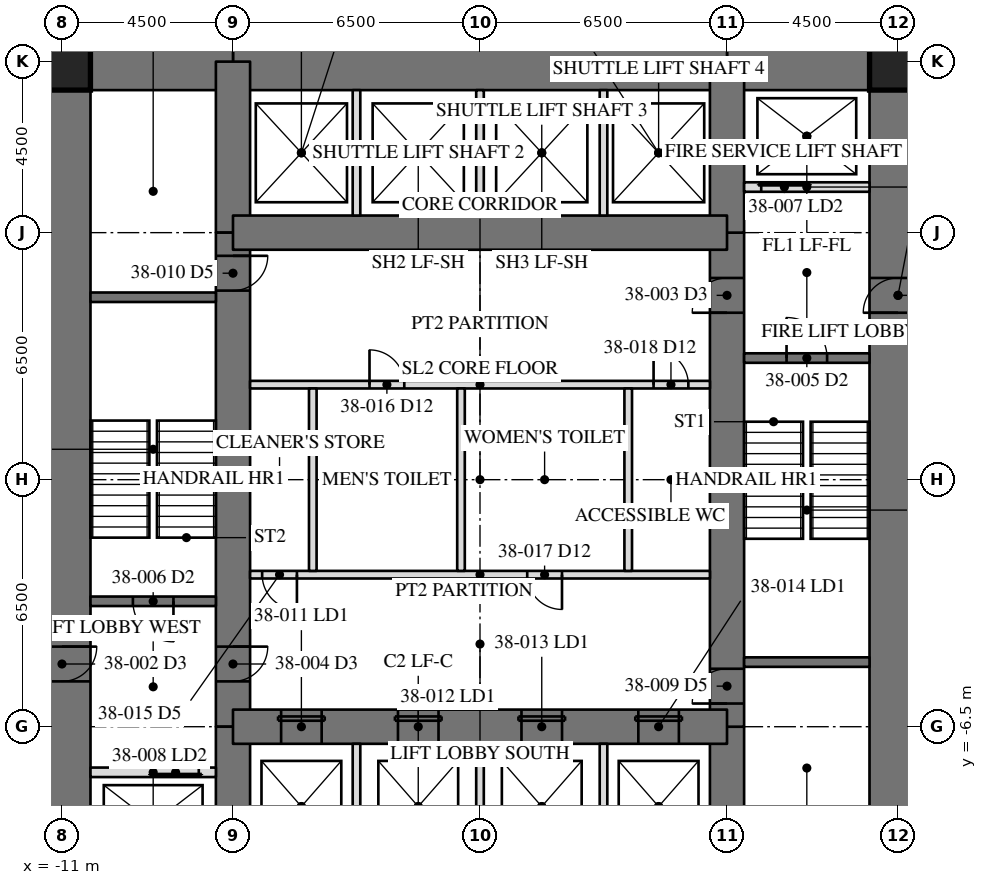
"""IFC4 building model, lengths in metres.
Left out: names, types, materials, properties, quantities, classifications, styles, units other than length and angle.
Written with IfcOpenShell. Run it as: python <this file> out.ifc"""

import sys

from ifc_helpers import new_model, si_unit, direction, frame, frame_2d, origin, origin_2d, place, context, subcontext, project, spatial, rectangle, hollow_rectangle, extrude, element, fill, save


model = new_model("IFC4")
c1 = context("Model", 3, precision=1e-05, world=origin(), true_north=direction((0.0, 1.0)))
c2 = subcontext(c1, "Body", "Model", "MODEL_VIEW")
j1 = project(units=[si_unit("LENGTHUNIT", "METRE"), si_unit("PLANEANGLEUNIT", "RADIAN")], contexts=[c1])
p1 = place(None, origin())
s1 = spatial("IfcSite", under=j1, at=p1, CompositionType="ELEMENT")
p2 = place(p1, origin())
s2 = spatial("IfcBuilding", under=s1, at=p2, CompositionType="ELEMENT")
p3 = place(p2, frame((0.0, 0.0, 162.3)))
s3 = spatial("IfcBuildingStorey", under=s2, at=p3, CompositionType="ELEMENT", Elevation=162.3)
p4 = place(p3, frame((11.0, -11.0, 0.0), z_axis=(0.0, 0.0, 1.0), x_axis=(0.0, 1.0, 0.0)))
e1 = element("IfcWall", 1, at=p4, inside=s3, PredefinedType="SHEAR", context=c2, shape_type="SweptSolid", body=[
    extrude(rectangle(XDim=22.0, YDim=1.5, at=frame_2d((11.0, 0.0))), origin(), (0.0, 0.0, 1.0), 4.1),
])
p5 = place(p4, frame((15.393, 0.0, 0.0)))
e2 = element("IfcOpeningElement", 2, at=p5, cuts=e1, PredefinedType="OPENING", context=c2, shape_type="SweptSolid", body=[
    extrude(rectangle(XDim=0.915, YDim=2.134, at=frame_2d((0.458, 1.067))), frame((0.0, 0.76, 0.0), z_axis=(0.0, -1.0, 0.0), x_axis=(1.0, 0.0, 0.0)), (0.0, 0.0, 1.0), 1.52),
])
p6 = place(p3, frame((-11.0, 11.0, 0.0), z_axis=(0.0, 0.0, 1.0), x_axis=(0.0, -1.0, 0.0)))
e3 = element("IfcWall", 3, at=p6, inside=s3, PredefinedType="SHEAR", context=c2, shape_type="SweptSolid", body=[
    extrude(rectangle(XDim=22.0, YDim=1.5, at=frame_2d((11.0, 0.0))), origin(), (0.0, 0.0, 1.0), 4.1),
])
p7 = place(p6, frame((15.393, 0.0, 0.0)))
e4 = element("IfcOpeningElement", 4, at=p7, cuts=e3, PredefinedType="OPENING", context=c2, shape_type="SweptSolid", body=[
    extrude(rectangle(XDim=0.915, YDim=2.134, at=frame_2d((0.458, 1.067))), frame((0.0, 0.76, 0.0), z_axis=(0.0, -1.0, 0.0), x_axis=(1.0, 0.0, 0.0)), (0.0, 0.0, 1.0), 1.52),
])
p8 = place(p3, frame((11.0, 11.0, 0.0), z_axis=(0.0, 0.0, 1.0), x_axis=(-1.0, 0.0, 0.0)))
e5 = element("IfcWall", 5, at=p8, inside=s3, PredefinedType="SHEAR", context=c2, shape_type="SweptSolid", body=[
    extrude(rectangle(XDim=4.5, YDim=1.5, at=frame_2d((2.25, 0.0))), origin(), (0.0, 0.0, 1.0), 4.1),
])
p9 = place(p3, frame((6.5, 11.0, 0.0), z_axis=(0.0, 0.0, 1.0), x_axis=(-1.0, 0.0, 0.0)))
e6 = element("IfcWall", 6, at=p9, inside=s3, PredefinedType="SHEAR", context=c2, shape_type="SweptSolid", body=[
    extrude(rectangle(XDim=13.0, YDim=1.5, at=frame_2d((6.5, 0.0))), origin(), (0.0, 0.0, 1.0), 4.1),
])
p10 = place(p3, frame((-6.5, 11.0, 0.0), z_axis=(0.0, 0.0, 1.0), x_axis=(-1.0, 0.0, 0.0)))
e7 = element("IfcWall", 7, at=p10, inside=s3, PredefinedType="SHEAR", context=c2, shape_type="SweptSolid", body=[
    extrude(rectangle(XDim=4.5, YDim=1.5, at=frame_2d((2.25, 0.0))), origin(), (0.0, 0.0, 1.0), 4.1),
])
p11 = place(p3, frame((6.5, -11.0, 0.0), z_axis=(0.0, 0.0, 1.0), x_axis=(0.0, 1.0, 0.0)))
e8 = element("IfcWall", 8, at=p11, inside=s3, PredefinedType="SHEAR", context=c2, shape_type="SweptSolid", body=[
    extrude(rectangle(XDim=4.5, YDim=0.9, at=frame_2d((2.25, 0.0))), origin(), (0.0, 0.0, 1.0), 4.1),
])
p12 = place(p3, frame((6.5, -6.5, 0.0), z_axis=(0.0, 0.0, 1.0), x_axis=(0.0, 1.0, 0.0)))
e9 = element("IfcWall", 9, at=p12, inside=s3, PredefinedType="SHEAR", context=c2, shape_type="SweptSolid", body=[
    extrude(rectangle(XDim=13.0, YDim=0.9, at=frame_2d((6.5, 0.0))), origin(), (0.0, 0.0, 1.0), 4.1),
])
p13 = place(p12, frame((10.893, 0.0, 0.0)))
e10 = element("IfcOpeningElement", 10, at=p13, cuts=e9, PredefinedType="OPENING", context=c2, shape_type="SweptSolid", body=[
    extrude(rectangle(XDim=0.915, YDim=2.134, at=frame_2d((0.458, 1.067))), frame((0.0, 0.46, 0.0), z_axis=(0.0, -1.0, 0.0), x_axis=(1.0, 0.0, 0.0)), (0.0, 0.0, 1.0), 0.92),
])
p14 = place(p12, frame((0.61, 0.0, 0.0)))
e11 = element("IfcOpeningElement", 11, at=p14, cuts=e9, PredefinedType="OPENING", context=c2, shape_type="SweptSolid", body=[
    extrude(rectangle(XDim=0.915, YDim=2.134, at=frame_2d((0.458, 1.067))), frame((0.0, 0.46, 0.0), z_axis=(0.0, -1.0, 0.0), x_axis=(1.0, 0.0, 0.0)), (0.0, 0.0, 1.0), 0.92),
])
for number, where, z_axis, x_axis in (
    (12, (6.5, 6.5, 0.0), (0.0, 0.0, 1.0), (0.0, 1.0, 0.0)),
    (13, (-6.5, 11.0, 0.0), (0.0, 0.0, 1.0), (0.0, -1.0, 0.0)),
):
    element("IfcWall", number, at=place(p3, frame(where, z_axis=z_axis, x_axis=x_axis)), inside=s3, PredefinedType="SHEAR", context=c2, shape_type="SweptSolid", body=[
        extrude(rectangle(XDim=4.5, YDim=0.9, at=frame_2d((2.25, 0.0))), origin(), (0.0, 0.0, 1.0), 4.1),
    ])
p15 = place(p3, frame((-6.5, 6.5, 0.0), z_axis=(0.0, 0.0, 1.0), x_axis=(0.0, -1.0, 0.0)))
e14 = element("IfcWall", 14, at=p15, inside=s3, PredefinedType="SHEAR", context=c2, shape_type="SweptSolid", body=[
    extrude(rectangle(XDim=13.0, YDim=0.9, at=frame_2d((6.5, 0.0))), origin(), (0.0, 0.0, 1.0), 4.1),
])
p16 = place(p15, frame((10.893, 0.0, 0.0)))
e15 = element("IfcOpeningElement", 15, at=p16, cuts=e14, PredefinedType="OPENING", context=c2, shape_type="SweptSolid", body=[
    extrude(rectangle(XDim=0.915, YDim=2.134, at=frame_2d((0.458, 1.067))), frame((0.0, 0.46, 0.0), z_axis=(0.0, -1.0, 0.0), x_axis=(1.0, 0.0, 0.0)), (0.0, 0.0, 1.0), 0.92),
])
p17 = place(p15, frame((0.61, 0.0, 0.0)))
e16 = element("IfcOpeningElement", 16, at=p17, cuts=e14, PredefinedType="OPENING", context=c2, shape_type="SweptSolid", body=[
    extrude(rectangle(XDim=0.915, YDim=2.134, at=frame_2d((0.458, 1.067))), frame((0.0, 0.46, 0.0), z_axis=(0.0, -1.0, 0.0), x_axis=(1.0, 0.0, 0.0)), (0.0, 0.0, 1.0), 0.92),
])
p18 = place(p3, frame((-6.5, -6.5, 0.0), z_axis=(0.0, 0.0, 1.0), x_axis=(0.0, -1.0, 0.0)))
e17 = element("IfcWall", 17, at=p18, inside=s3, PredefinedType="SHEAR", context=c2, shape_type="SweptSolid", body=[
    extrude(rectangle(XDim=4.5, YDim=0.9, at=frame_2d((2.25, 0.0))), origin(), (0.0, 0.0, 1.0), 4.1),
])
p19 = place(p3, frame((6.5, 6.5, 0.0), z_axis=(0.0, 0.0, 1.0), x_axis=(-1.0, 0.0, 0.0)))
e18 = element("IfcWall", 18, at=p19, inside=s3, PredefinedType="SHEAR", context=c2, shape_type="SweptSolid", body=[
    extrude(rectangle(XDim=13.0, YDim=0.9, at=frame_2d((6.5, 0.0))), origin(), (0.0, 0.0, 1.0), 4.1),
])
p20 = place(p3, frame((-6.5, -6.5, 0.0), z_axis=(0.0, 0.0, 1.0), x_axis=(1.0, 0.0, 0.0)))
e19 = element("IfcWall", 19, at=p20, inside=s3, PredefinedType="SHEAR", context=c2, shape_type="SweptSolid", body=[
    extrude(rectangle(XDim=13.0, YDim=0.9, at=frame_2d((6.5, 0.0))), origin(), (0.0, 0.0, 1.0), 4.1),
])
p21 = place(p20, frame((1.267, 0.0, 0.0)))
e20 = element("IfcOpeningElement", 20, at=p21, cuts=e19, PredefinedType="OPENING", context=c2, shape_type="SweptSolid", body=[
    extrude(rectangle(XDim=1.067, YDim=2.134, at=frame_2d((0.533, 1.067))), frame((0.0, 0.46, 0.0), z_axis=(0.0, -1.0, 0.0), x_axis=(1.0, 0.0, 0.0)), (0.0, 0.0, 1.0), 0.92),
])
p22 = place(p20, frame((4.342, 0.0, 0.0)))
e21 = element("IfcOpeningElement", 21, at=p22, cuts=e19, PredefinedType="OPENING", context=c2, shape_type="SweptSolid", body=[
    extrude(rectangle(XDim=1.067, YDim=2.134, at=frame_2d((0.533, 1.067))), frame((0.0, 0.46, 0.0), z_axis=(0.0, -1.0, 0.0), x_axis=(1.0, 0.0, 0.0)), (0.0, 0.0, 1.0), 0.92),
])
p23 = place(p20, frame((7.592, 0.0, 0.0)))
e22 = element("IfcOpeningElement", 22, at=p23, cuts=e19, PredefinedType="OPENING", context=c2, shape_type="SweptSolid", body=[
    extrude(rectangle(XDim=1.067, YDim=2.134, at=frame_2d((0.533, 1.067))), frame((0.0, 0.46, 0.0), z_axis=(0.0, -1.0, 0.0), x_axis=(1.0, 0.0, 0.0)), (0.0, 0.0, 1.0), 0.92),
])
p24 = place(p20, frame((10.667, 0.0, 0.0)))
e23 = element("IfcOpeningElement", 23, at=p24, cuts=e19, PredefinedType="OPENING", context=c2, shape_type="SweptSolid", body=[
    extrude(rectangle(XDim=1.067, YDim=2.134, at=frame_2d((0.533, 1.067))), frame((0.0, 0.46, 0.0), z_axis=(0.0, -1.0, 0.0), x_axis=(1.0, 0.0, 0.0)), (0.0, 0.0, 1.0), 0.92),
])
for number, where, z_axis, x_axis in (
    (24, (11.0, 11.0, 0.0), (0.0, 0.0, 1.0), (1.0, 0.0, 0.0)),
    (25, (-11.0, 11.0, 0.0), (0.0, 0.0, 1.0), (1.0, 0.0, 0.0)),
):
    element("IfcColumn", number, at=place(p3, frame(where, z_axis=z_axis, x_axis=x_axis)), inside=s3, PredefinedType="COLUMN", context=c2, shape_type="SweptSolid", body=[
        extrude(hollow_rectangle(XDim=1.499, YDim=1.499, WallThickness=0.102, at=origin_2d()), origin(), (0.0, 0.0, 1.0), 4.1),
    ])
for number, where, z_axis, x_axis in (
    (26, (6.95, -4.8, 0.0), (0.0, 0.0, 1.0), (1.0, 0.0, 0.0)),
    (27, (-6.95, 4.8, 0.0), (0.0, 0.0, 1.0), (-1.0, 0.0, 0.0)),
):
    element("IfcWall", number, at=place(p3, frame(where, z_axis=z_axis, x_axis=x_axis)), inside=s3, PredefinedType="SOLIDWALL", context=c2, shape_type="SweptSolid", body=[
        extrude(rectangle(XDim=3.3, YDim=0.25, at=frame_2d((1.65, 0.0))), origin(), (0.0, 0.0, 1.0), 3.91),
    ])
p25 = place(p3, frame((6.95, 3.2, 0.0), z_axis=(0.0, 0.0, 1.0), x_axis=(1.0, 0.0, 0.0)))
e28 = element("IfcWall", 28, at=p25, inside=s3, PredefinedType="SOLIDWALL", context=c2, shape_type="SweptSolid", body=[
    extrude(rectangle(XDim=3.3, YDim=0.25, at=frame_2d((1.65, 0.0))), origin(), (0.0, 0.0, 1.0), 3.91),
])
p26 = place(p25, frame((1.116, 0.0, 0.0)))
e29 = element("IfcOpeningElement", 29, at=p26, cuts=e28, PredefinedType="OPENING", context=c2, shape_type="SweptSolid", body=[
    extrude(rectangle(XDim=1.067, YDim=2.134, at=frame_2d((0.533, 1.067))), frame((0.0, 0.135, 0.0), z_axis=(0.0, -1.0, 0.0), x_axis=(1.0, 0.0, 0.0)), (0.0, 0.0, 1.0), 0.27),
])
p27 = place(p3, frame((-6.95, -3.2, 0.0), z_axis=(0.0, 0.0, 1.0), x_axis=(-1.0, 0.0, 0.0)))
e30 = element("IfcWall", 30, at=p27, inside=s3, PredefinedType="SOLIDWALL", context=c2, shape_type="SweptSolid", body=[
    extrude(rectangle(XDim=3.3, YDim=0.25, at=frame_2d((1.65, 0.0))), origin(), (0.0, 0.0, 1.0), 3.91),
])
p28 = place(p27, frame((1.116, 0.0, 0.0)))
e31 = element("IfcOpeningElement", 31, at=p28, cuts=e30, PredefinedType="OPENING", context=c2, shape_type="SweptSolid", body=[
    extrude(rectangle(XDim=1.067, YDim=2.134, at=frame_2d((0.533, 1.067))), frame((0.0, 0.135, 0.0), z_axis=(0.0, -1.0, 0.0), x_axis=(1.0, 0.0, 0.0)), (0.0, 0.0, 1.0), 0.27),
])
p29 = place(p3, frame((6.95, 7.7, 0.0), z_axis=(0.0, 0.0, 1.0), x_axis=(1.0, 0.0, 0.0)))
e32 = element("IfcWall", 32, at=p29, inside=s3, PredefinedType="PARTITIONING", context=c2, shape_type="SweptSolid", body=[
    extrude(rectangle(XDim=3.3, YDim=0.25, at=frame_2d((1.65, 0.0))), origin(), (0.0, 0.0, 1.0), 3.91),
])
p30 = place(p29, frame((0.45, 0.0, 0.0)))
e33 = element("IfcOpeningElement", 33, at=p30, cuts=e32, PredefinedType="OPENING", context=c2, shape_type="SweptSolid", body=[
    extrude(rectangle(XDim=1.219, YDim=2.134, at=frame_2d((0.609, 1.067))), frame((0.0, 0.135, 0.0), z_axis=(0.0, -1.0, 0.0), x_axis=(1.0, 0.0, 0.0)), (0.0, 0.0, 1.0), 0.27),
])
p31 = place(p3, frame((-6.95, -7.7, 0.0), z_axis=(0.0, 0.0, 1.0), x_axis=(-1.0, 0.0, 0.0)))
e34 = element("IfcWall", 34, at=p31, inside=s3, PredefinedType="PARTITIONING", context=c2, shape_type="SweptSolid", body=[
    extrude(rectangle(XDim=3.3, YDim=0.25, at=frame_2d((1.65, 0.0))), origin(), (0.0, 0.0, 1.0), 3.91),
])
p32 = place(p31, frame((0.45, 0.0, 0.0)))
e35 = element("IfcOpeningElement", 35, at=p32, cuts=e34, PredefinedType="OPENING", context=c2, shape_type="SweptSolid", body=[
    extrude(rectangle(XDim=1.219, YDim=2.134, at=frame_2d((0.609, 1.067))), frame((0.0, 0.135, 0.0), z_axis=(0.0, -1.0, 0.0), x_axis=(1.0, 0.0, 0.0)), (0.0, 0.0, 1.0), 0.27),
])
p33 = place(p3, frame((-6.05, 2.5, 0.0), z_axis=(0.0, 0.0, 1.0), x_axis=(1.0, 0.0, 0.0)))
e36 = element("IfcWall", 36, at=p33, inside=s3, PredefinedType="PARTITIONING", context=c2, shape_type="SweptSolid", body=[
    extrude(rectangle(XDim=12.1, YDim=0.2, at=frame_2d((6.05, 0.0))), origin(), (0.0, 0.0, 1.0), 3.91),
])
p34 = place(p33, frame((3.143, 0.0, 0.0)))
e37 = element("IfcOpeningElement", 37, at=p34, cuts=e36, PredefinedType="OPENING", context=c2, shape_type="SweptSolid", body=[
    extrude(rectangle(XDim=0.915, YDim=2.134, at=frame_2d((0.458, 1.067))), frame((0.0, 0.11, 0.0), z_axis=(0.0, -1.0, 0.0), x_axis=(1.0, 0.0, 0.0)), (0.0, 0.0, 1.0), 0.22),
])
p35 = place(p33, frame((10.617, 0.0, 0.0)))
e38 = element("IfcOpeningElement", 38, at=p35, cuts=e36, PredefinedType="OPENING", context=c2, shape_type="SweptSolid", body=[
    extrude(rectangle(XDim=0.915, YDim=2.134, at=frame_2d((0.458, 1.067))), frame((0.0, 0.11, 0.0), z_axis=(0.0, -1.0, 0.0), x_axis=(1.0, 0.0, 0.0)), (0.0, 0.0, 1.0), 0.22),
])
p36 = place(p3, frame((6.05, -2.5, 0.0), z_axis=(0.0, 0.0, 1.0), x_axis=(-1.0, 0.0, 0.0)))
e39 = element("IfcWall", 39, at=p36, inside=s3, PredefinedType="PARTITIONING", context=c2, shape_type="SweptSolid", body=[
    extrude(rectangle(XDim=12.1, YDim=0.2, at=frame_2d((6.05, 0.0))), origin(), (0.0, 0.0, 1.0), 3.91),
])
p37 = place(p36, frame((10.867, 0.0, 0.0)))
e40 = element("IfcOpeningElement", 40, at=p37, cuts=e39, PredefinedType="OPENING", context=c2, shape_type="SweptSolid", body=[
    extrude(rectangle(XDim=0.915, YDim=2.134, at=frame_2d((0.458, 1.067))), frame((0.0, 0.11, 0.0), z_axis=(0.0, -1.0, 0.0), x_axis=(1.0, 0.0, 0.0)), (0.0, 0.0, 1.0), 0.22),
])
p38 = place(p36, frame((3.893, 0.0, 0.0)))
e41 = element("IfcOpeningElement", 41, at=p38, cuts=e39, PredefinedType="OPENING", context=c2, shape_type="SweptSolid", body=[
    extrude(rectangle(XDim=0.915, YDim=2.134, at=frame_2d((0.458, 1.067))), frame((0.0, 0.11, 0.0), z_axis=(0.0, -1.0, 0.0), x_axis=(1.0, 0.0, 0.0)), (0.0, 0.0, 1.0), 0.22),
])
for number, where, z_axis, x_axis in (
    (42, (-3.25, 6.95, 0.0), (0.0, 0.0, 1.0), (0.0, 1.0, 0.0)),
    (43, (0.0, 6.95, 0.0), (0.0, 0.0, 1.0), (0.0, 1.0, 0.0)),
    (44, (3.25, 6.95, 0.0), (0.0, 0.0, 1.0), (0.0, 1.0, 0.0)),
    (45, (-3.25, -10.25, 0.0), (0.0, 0.0, 1.0), (0.0, 1.0, 0.0)),
    (46, (0.0, -10.25, 0.0), (0.0, 0.0, 1.0), (0.0, 1.0, 0.0)),
    (47, (3.25, -10.25, 0.0), (0.0, 0.0, 1.0), (0.0, 1.0, 0.0)),
):
    element("IfcWall", number, at=place(p3, frame(where, z_axis=z_axis, x_axis=x_axis)), inside=s3, PredefinedType="PARTITIONING", context=c2, shape_type="SweptSolid", body=[
        extrude(rectangle(XDim=3.3, YDim=0.2, at=frame_2d((1.65, 0.0))), origin(), (0.0, 0.0, 1.0), 3.91),
    ])
for number, where, z_axis, x_axis in (
    (48, (-4.4, -2.4, 0.0), (0.0, 0.0, 1.0), (0.0, 1.0, 0.0)),
    (49, (-0.5, -2.4, 0.0), (0.0, 0.0, 1.0), (0.0, 1.0, 0.0)),
    (50, (3.9, -2.4, 0.0), (0.0, 0.0, 1.0), (0.0, 1.0, 0.0)),
):
    element("IfcWall", number, at=place(p3, frame(where, z_axis=z_axis, x_axis=x_axis)), inside=s3, PredefinedType="PARTITIONING", context=c2, shape_type="SweptSolid", body=[
        extrude(rectangle(XDim=4.8, YDim=0.2, at=frame_2d((2.4, 0.0))), origin(), (0.0, 0.0, 1.0), 3.91),
    ])
p39 = place(p13, origin())
e51 = element("IfcDoor", 51, at=p39, inside=s3, OperationType="SINGLE_SWING_RIGHT", PredefinedType="DOOR", context=c2, shape_type="SweptSolid", body=[
    extrude(rectangle(XDim=0.915, YDim=2.134, at=frame_2d((0.458, 1.067))), frame((0.0, -0.375, 0.0), z_axis=(0.0, -1.0, 0.0), x_axis=(1.0, 0.0, 0.0)), (0.0, 0.0, 1.0), 0.05),
])
fill(e10, e51)
p40 = place(p16, origin())
e52 = element("IfcDoor", 52, at=p40, inside=s3, OperationType="SINGLE_SWING_RIGHT", PredefinedType="DOOR", context=c2, shape_type="SweptSolid", body=[
    extrude(rectangle(XDim=0.915, YDim=2.134, at=frame_2d((0.458, 1.067))), frame((0.0, -0.375, 0.0), z_axis=(0.0, -1.0, 0.0), x_axis=(1.0, 0.0, 0.0)), (0.0, 0.0, 1.0), 0.05),
])
fill(e15, e52)
p41 = place(p26, origin())
e53 = element("IfcDoor", 53, at=p41, inside=s3, OperationType="SINGLE_SWING_LEFT", PredefinedType="DOOR", context=c2, shape_type="SweptSolid", body=[
    extrude(rectangle(XDim=1.067, YDim=2.134, at=frame_2d((0.533, 1.067))), frame((0.0, 0.025, 0.0), z_axis=(0.0, -1.0, 0.0), x_axis=(1.0, 0.0, 0.0)), (0.0, 0.0, 1.0), 0.05),
])
fill(e29, e53)
p42 = place(p28, origin())
e54 = element("IfcDoor", 54, at=p42, inside=s3, OperationType="SINGLE_SWING_LEFT", PredefinedType="DOOR", context=c2, shape_type="SweptSolid", body=[
    extrude(rectangle(XDim=1.067, YDim=2.134, at=frame_2d((0.533, 1.067))), frame((0.0, 0.025, 0.0), z_axis=(0.0, -1.0, 0.0), x_axis=(1.0, 0.0, 0.0)), (0.0, 0.0, 1.0), 0.05),
])
fill(e31, e54)
p43 = place(p30, origin())
e55 = element("IfcDoor", 55, at=p43, inside=s3, OperationType="SLIDING_TO_LEFT", PredefinedType="DOOR", context=c2, shape_type="SweptSolid", body=[
    extrude(rectangle(XDim=1.219, YDim=2.134, at=frame_2d((0.609, 1.067))), frame((0.0, 0.025, 0.0), z_axis=(0.0, -1.0, 0.0), x_axis=(1.0, 0.0, 0.0)), (0.0, 0.0, 1.0), 0.05),
])
fill(e33, e55)
p44 = place(p32, origin())
e56 = element("IfcDoor", 56, at=p44, inside=s3, OperationType="SLIDING_TO_LEFT", PredefinedType="DOOR", context=c2, shape_type="SweptSolid", body=[
    extrude(rectangle(XDim=1.219, YDim=2.134, at=frame_2d((0.609, 1.067))), frame((0.0, 0.025, 0.0), z_axis=(0.0, -1.0, 0.0), x_axis=(1.0, 0.0, 0.0)), (0.0, 0.0, 1.0), 0.05),
])
fill(e35, e56)
p45 = place(p14, origin())
e57 = element("IfcDoor", 57, at=p45, inside=s3, OperationType="SINGLE_SWING_RIGHT", PredefinedType="DOOR", context=c2, shape_type="SweptSolid", body=[
    extrude(rectangle(XDim=0.915, YDim=2.134, at=frame_2d((0.458, 1.067))), frame((0.0, -0.375, 0.0), z_axis=(0.0, -1.0, 0.0), x_axis=(1.0, 0.0, 0.0)), (0.0, 0.0, 1.0), 0.05),
])
fill(e11, e57)
p46 = place(p17, origin())
e58 = element("IfcDoor", 58, at=p46, inside=s3, OperationType="SINGLE_SWING_RIGHT", PredefinedType="DOOR", context=c2, shape_type="SweptSolid", body=[
    extrude(rectangle(XDim=0.915, YDim=2.134, at=frame_2d((0.458, 1.067))), frame((0.0, -0.375, 0.0), z_axis=(0.0, -1.0, 0.0), x_axis=(1.0, 0.0, 0.0)), (0.0, 0.0, 1.0), 0.05),
])
fill(e16, e58)
p47 = place(p21, origin())
e59 = element("IfcDoor", 59, at=p47, inside=s3, OperationType="SLIDING_TO_LEFT", PredefinedType="DOOR", context=c2, shape_type="SweptSolid", body=[
    extrude(rectangle(XDim=1.067, YDim=2.134, at=frame_2d((0.533, 1.067))), frame((0.0, -0.375, 0.0), z_axis=(0.0, -1.0, 0.0), x_axis=(1.0, 0.0, 0.0)), (0.0, 0.0, 1.0), 0.05),
])
fill(e20, e59)
p48 = place(p22, origin())
e60 = element("IfcDoor", 60, at=p48, inside=s3, OperationType="SLIDING_TO_LEFT", PredefinedType="DOOR", context=c2, shape_type="SweptSolid", body=[
    extrude(rectangle(XDim=1.067, YDim=2.134, at=frame_2d((0.533, 1.067))), frame((0.0, -0.375, 0.0), z_axis=(0.0, -1.0, 0.0), x_axis=(1.0, 0.0, 0.0)), (0.0, 0.0, 1.0), 0.05),
])
fill(e21, e60)
p49 = place(p23, origin())
e61 = element("IfcDoor", 61, at=p49, inside=s3, OperationType="SLIDING_TO_LEFT", PredefinedType="DOOR", context=c2, shape_type="SweptSolid", body=[
    extrude(rectangle(XDim=1.067, YDim=2.134, at=frame_2d((0.533, 1.067))), frame((0.0, -0.375, 0.0), z_axis=(0.0, -1.0, 0.0), x_axis=(1.0, 0.0, 0.0)), (0.0, 0.0, 1.0), 0.05),
])
fill(e22, e61)
p50 = place(p24, origin())
e62 = element("IfcDoor", 62, at=p50, inside=s3, OperationType="SLIDING_TO_LEFT", PredefinedType="DOOR", context=c2, shape_type="SweptSolid", body=[
    extrude(rectangle(XDim=1.067, YDim=2.134, at=frame_2d((0.533, 1.067))), frame((0.0, -0.375, 0.0), z_axis=(0.0, -1.0, 0.0), x_axis=(1.0, 0.0, 0.0)), (0.0, 0.0, 1.0), 0.05),
])
fill(e23, e62)
p51 = place(p37, origin())
e63 = element("IfcDoor", 63, at=p51, inside=s3, OperationType="SINGLE_SWING_RIGHT", PredefinedType="DOOR", context=c2, shape_type="SweptSolid", body=[
    extrude(rectangle(XDim=0.915, YDim=2.134, at=frame_2d((0.458, 1.067))), frame((0.0, 0.025, 0.0), z_axis=(0.0, -1.0, 0.0), x_axis=(1.0, 0.0, 0.0)), (0.0, 0.0, 1.0), 0.05),
])
fill(e40, e63)
p52 = place(p34, origin())
e64 = element("IfcDoor", 64, at=p52, inside=s3, OperationType="SINGLE_SWING_LEFT", PredefinedType="DOOR", context=c2, shape_type="SweptSolid", body=[
    extrude(rectangle(XDim=0.915, YDim=2.134, at=frame_2d((0.458, 1.067))), frame((0.0, 0.025, 0.0), z_axis=(0.0, -1.0, 0.0), x_axis=(1.0, 0.0, 0.0)), (0.0, 0.0, 1.0), 0.05),
])
fill(e37, e64)
p53 = place(p38, origin())
e65 = element("IfcDoor", 65, at=p53, inside=s3, OperationType="SINGLE_SWING_LEFT", PredefinedType="DOOR", context=c2, shape_type="SweptSolid", body=[
    extrude(rectangle(XDim=0.915, YDim=2.134, at=frame_2d((0.458, 1.067))), frame((0.0, 0.025, 0.0), z_axis=(0.0, -1.0, 0.0), x_axis=(1.0, 0.0, 0.0)), (0.0, 0.0, 1.0), 0.05),
])
fill(e41, e65)
p54 = place(p35, origin())
e66 = element("IfcDoor", 66, at=p54, inside=s3, OperationType="SINGLE_SWING_LEFT", PredefinedType="DOOR", context=c2, shape_type="SweptSolid", body=[
    extrude(rectangle(XDim=0.915, YDim=2.134, at=frame_2d((0.458, 1.067))), frame((0.0, 0.025, 0.0), z_axis=(0.0, -1.0, 0.0), x_axis=(1.0, 0.0, 0.0)), (0.0, 0.0, 1.0), 0.05),
])
fill(e38, e66)
save(model, sys.argv[1])
